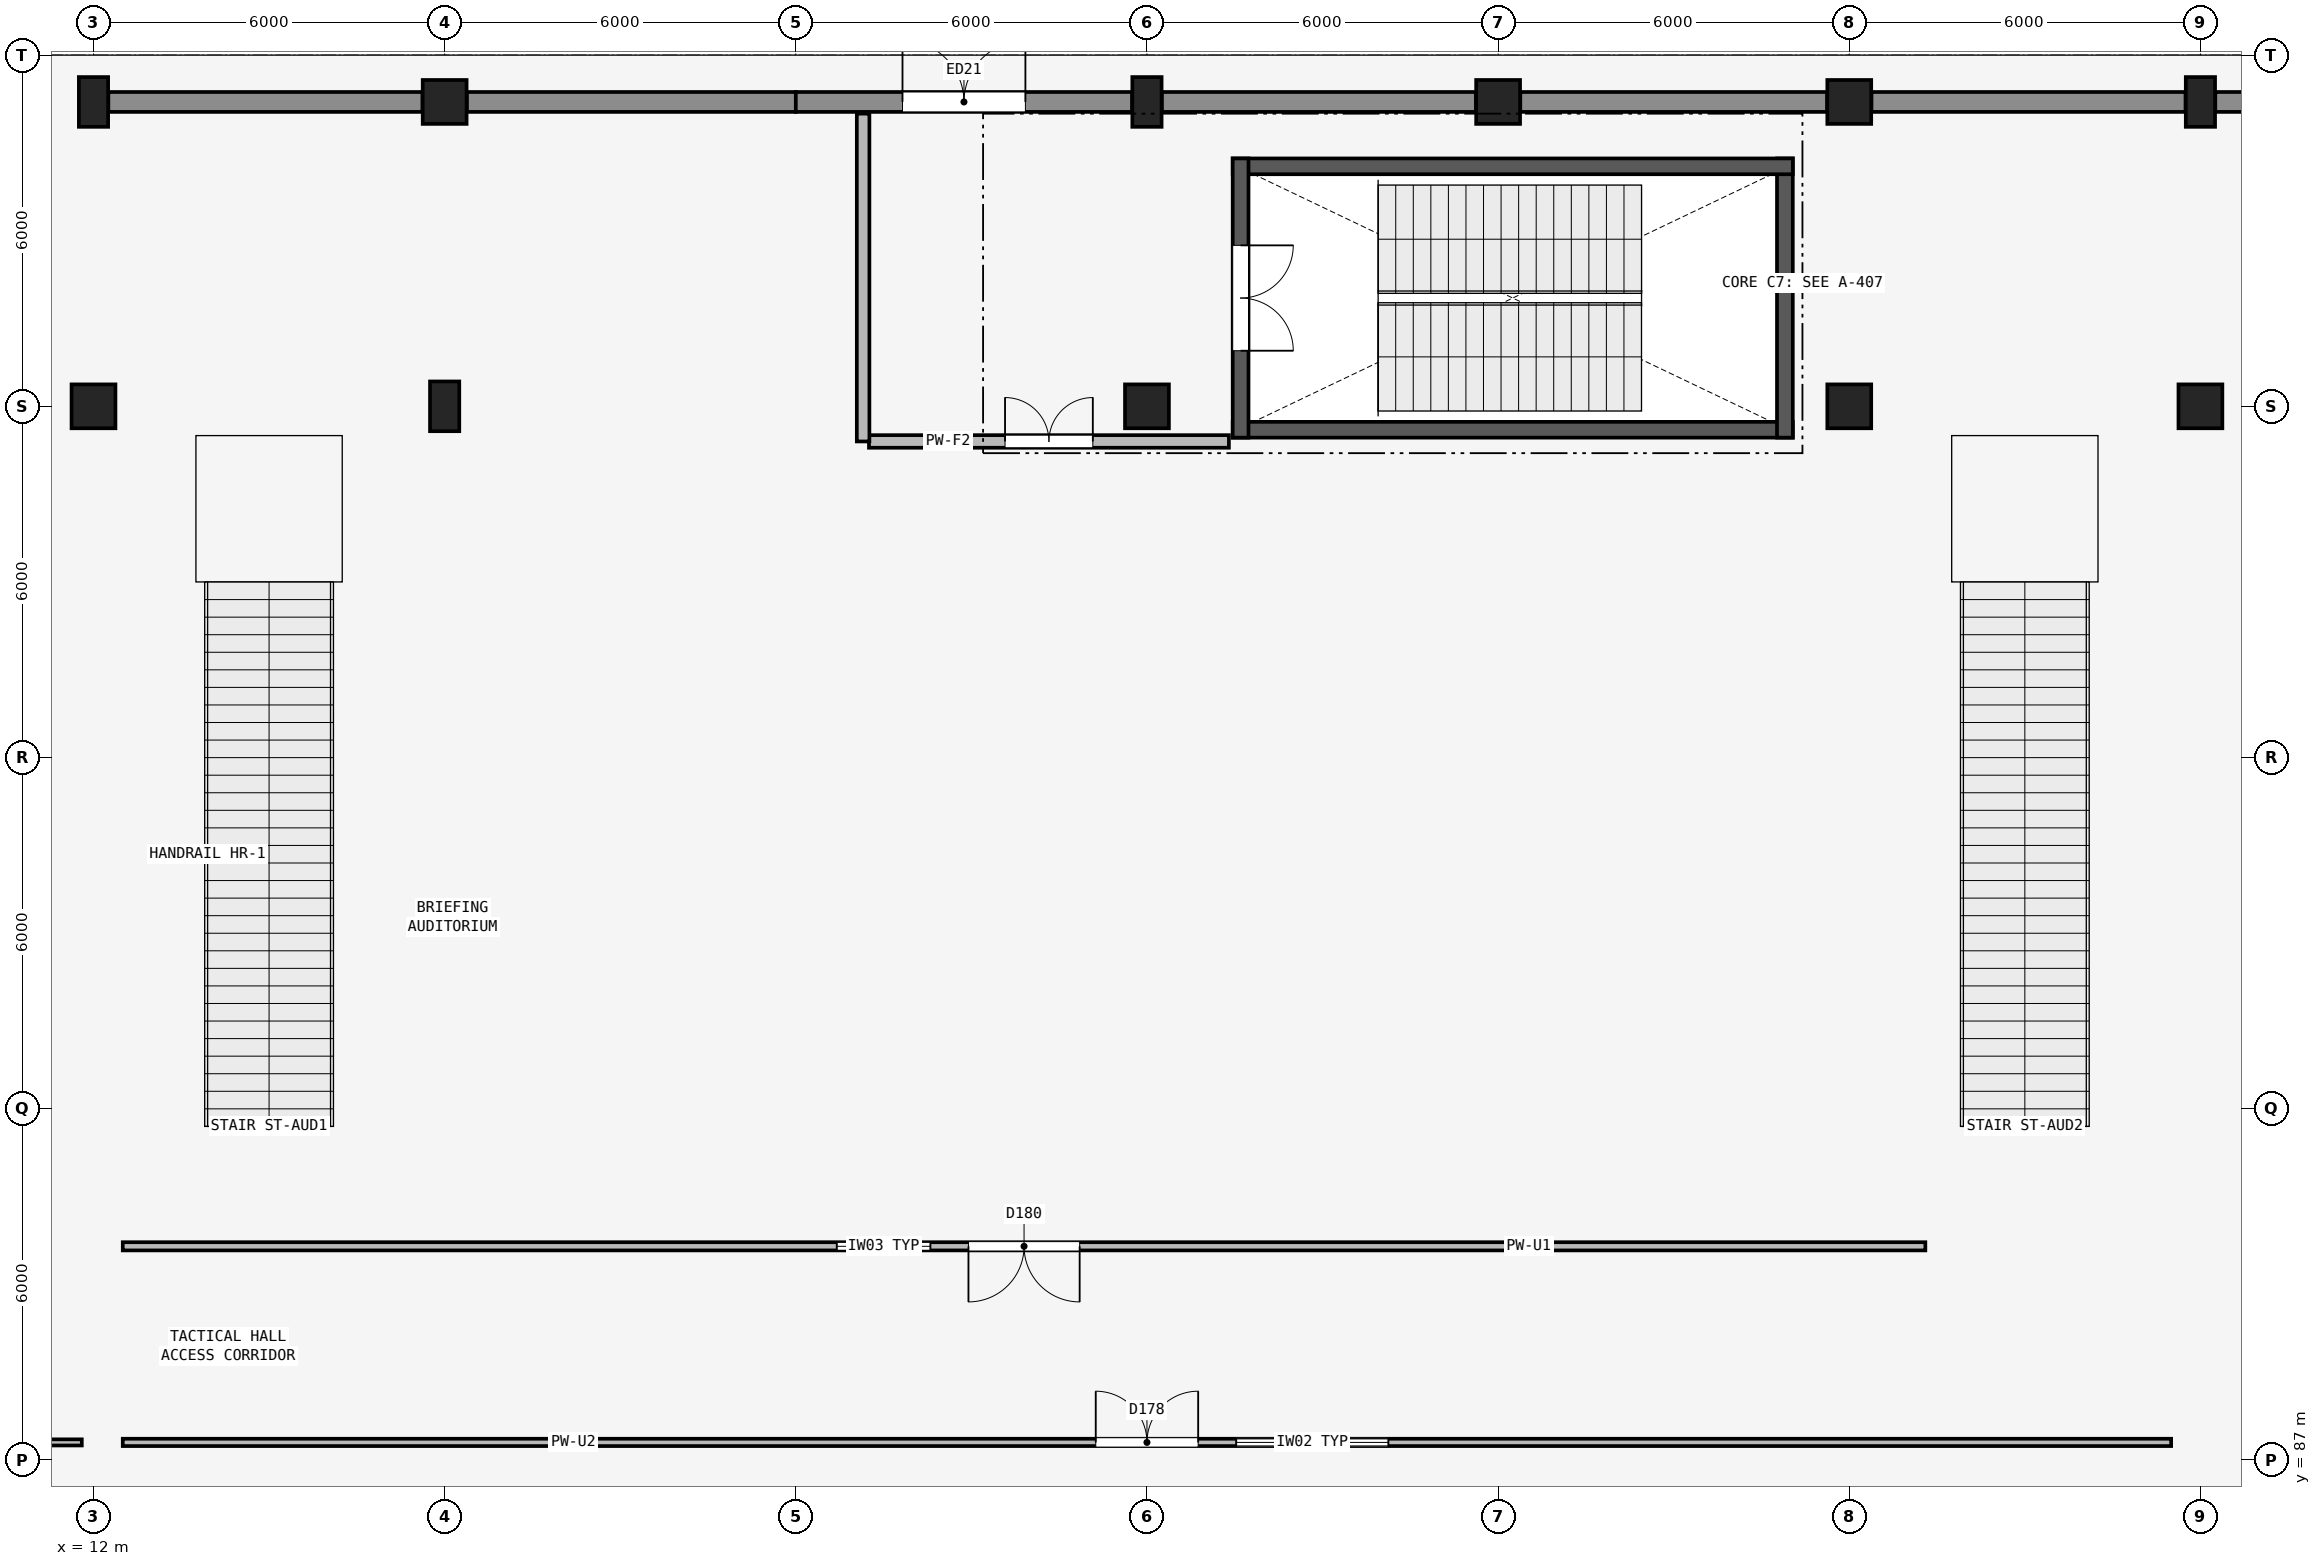
"""IFC4 building model, lengths in metres.
Left out: names, types, materials, properties, quantities, classifications, styles, units other than length and angle.
Written with IfcOpenShell. Run it as: python <this file> out.ifc"""

import sys

from ifc_helpers import new_model, si_unit, direction, frame, frame_2d, origin, origin_2d, place, context, subcontext, project, spatial, rectangle, extrude, element, fill, save


model = new_model("IFC4")
c1 = context("Model", 3, precision=1e-05, world=origin(), true_north=direction((0.0, 1.0)))
c2 = subcontext(c1, "Body", "Model", "MODEL_VIEW")
j1 = project(units=[si_unit("LENGTHUNIT", "METRE"), si_unit("PLANEANGLEUNIT", "RADIAN")], contexts=[c1])
p1 = place(None, origin())
s1 = spatial("IfcSite", under=j1, at=p1, CompositionType="ELEMENT")
p2 = place(p1, origin())
s2 = spatial("IfcBuilding", under=s1, at=p2, CompositionType="ELEMENT")
p3 = place(p2, origin())
s3 = spatial("IfcBuildingStorey", under=s2, at=p3, CompositionType="ELEMENT", Elevation=0.0)
p4 = place(p3, frame((12.0, 105.0, 0.0), z_axis=(0.0, 0.0, 1.0), x_axis=(1.0, 0.0, 0.0)))
e1 = element("IfcColumn", 1, at=p4, inside=s3, PredefinedType="COLUMN", context=c2, shape_type="SweptSolid", body=[
    extrude(rectangle(XDim=0.75, YDim=0.75, at=origin_2d()), origin(), (0.0, 0.0, 1.0), 4.8),
])
for number, where, z_axis, x_axis in (
    (2, (12.0, 110.2, 0.0), (0.0, 0.0, 1.0), (1.0, 0.0, 0.0)),
    (3, (18.0, 105.0, 0.0), (0.0, 0.0, 1.0), (1.0, 0.0, 0.0)),
):
    element("IfcColumn", number, at=place(p3, frame(where, z_axis=z_axis, x_axis=x_axis)), inside=s3, PredefinedType="COLUMN", context=c2, shape_type="SweptSolid", body=[
        extrude(rectangle(XDim=0.5, YDim=0.85, at=origin_2d()), origin(), (0.0, 0.0, 1.0), 4.8),
    ])
for number, where, z_axis, x_axis in (
    (4, (18.0, 110.2, 0.0), (0.0, 0.0, 1.0), (1.0, 0.0, 0.0)),
    (5, (30.0, 105.0, 0.0), (0.0, 0.0, 1.0), (1.0, 0.0, 0.0)),
):
    element("IfcColumn", number, at=place(p3, frame(where, z_axis=z_axis, x_axis=x_axis)), inside=s3, PredefinedType="COLUMN", context=c2, shape_type="SweptSolid", body=[
        extrude(rectangle(XDim=0.75, YDim=0.75, at=origin_2d()), origin(), (0.0, 0.0, 1.0), 4.8),
    ])
p5 = place(p3, frame((30.0, 110.2, 0.0), z_axis=(0.0, 0.0, 1.0), x_axis=(1.0, 0.0, 0.0)))
e6 = element("IfcColumn", 6, at=p5, inside=s3, PredefinedType="COLUMN", context=c2, shape_type="SweptSolid", body=[
    extrude(rectangle(XDim=0.5, YDim=0.85, at=origin_2d()), origin(), (0.0, 0.0, 1.0), 4.8),
])
for number, where, z_axis, x_axis in (
    (7, (36.0, 110.2, 0.0), (0.0, 0.0, 1.0), (1.0, 0.0, 0.0)),
    (8, (42.0, 105.0, 0.0), (0.0, 0.0, 1.0), (1.0, 0.0, 0.0)),
    (9, (42.0, 110.2, 0.0), (0.0, 0.0, 1.0), (1.0, 0.0, 0.0)),
    (10, (48.0, 105.0, 0.0), (0.0, 0.0, 1.0), (1.0, 0.0, 0.0)),
):
    element("IfcColumn", number, at=place(p3, frame(where, z_axis=z_axis, x_axis=x_axis)), inside=s3, PredefinedType="COLUMN", context=c2, shape_type="SweptSolid", body=[
        extrude(rectangle(XDim=0.75, YDim=0.75, at=origin_2d()), origin(), (0.0, 0.0, 1.0), 4.8),
    ])
p6 = place(p3, frame((48.0, 110.2, 0.0), z_axis=(0.0, 0.0, 1.0), x_axis=(1.0, 0.0, 0.0)))
e11 = element("IfcColumn", 11, at=p6, inside=s3, PredefinedType="COLUMN", context=c2, shape_type="SweptSolid", body=[
    extrude(rectangle(XDim=0.5, YDim=0.85, at=origin_2d()), origin(), (0.0, 0.0, 1.0), 4.8),
])
p7 = place(p3, frame((12.254, 110.2, 0.0), z_axis=(0.0, 0.0, 1.0), x_axis=(1.0, 0.0, 0.0)))
e12 = element("IfcWall", 12, at=p7, inside=s3, PredefinedType="SOLIDWALL", context=c2, shape_type="SweptSolid", body=[
    extrude(rectangle(XDim=5.367, YDim=0.34, at=frame_2d((2.684, 0.0))), origin(), (0.0, 0.0, 1.0), 4.083),
])
p8 = place(p3, frame((18.379, 110.2, 0.0), z_axis=(0.0, 0.0, 1.0), x_axis=(1.0, 0.0, 0.0)))
e13 = element("IfcWall", 13, at=p8, inside=s3, PredefinedType="SOLIDWALL", context=c2, shape_type="SweptSolid", body=[
    extrude(rectangle(XDim=5.621, YDim=0.34, at=frame_2d((2.811, 0.0))), origin(), (0.0, 0.0, 1.0), 3.69),
])
p9 = place(p3, frame((24.0, 110.2, 0.0), z_axis=(0.0, 0.0, 1.0), x_axis=(1.0, 0.0, 0.0)))
e14 = element("IfcWall", 14, at=p9, inside=s3, PredefinedType="SOLIDWALL", context=c2, shape_type="SweptSolid", body=[
    extrude(rectangle(XDim=5.746, YDim=0.34, at=frame_2d((2.873, 0.0))), origin(), (0.0, 0.0, 1.0), 3.69),
])
p10 = place(p9, frame((1.823, 0.0, 0.0)))
e15 = element("IfcOpeningElement", 15, at=p10, cuts=e14, PredefinedType="OPENING", context=c2, shape_type="SweptSolid", body=[
    extrude(rectangle(XDim=2.1, YDim=2.4, at=frame_2d((1.05, 1.2))), frame((0.0, 0.18, 0.0), z_axis=(0.0, -1.0, 0.0), x_axis=(1.0, 0.0, 0.0)), (0.0, 0.0, 1.0), 0.36),
])
p11 = place(p3, frame((30.254, 110.2, 0.0), z_axis=(0.0, 0.0, 1.0), x_axis=(1.0, 0.0, 0.0)))
e16 = element("IfcWall", 16, at=p11, inside=s3, PredefinedType="SOLIDWALL", context=c2, shape_type="SweptSolid", body=[
    extrude(rectangle(XDim=5.367, YDim=0.34, at=frame_2d((2.684, 0.0))), origin(), (0.0, 0.0, 1.0), 3.69),
])
p12 = place(p3, frame((36.379, 110.2, 0.0), z_axis=(0.0, 0.0, 1.0), x_axis=(1.0, 0.0, 0.0)))
e17 = element("IfcWall", 17, at=p12, inside=s3, PredefinedType="SOLIDWALL", context=c2, shape_type="SweptSolid", body=[
    extrude(rectangle(XDim=5.242, YDim=0.34, at=frame_2d((2.621, 0.0))), origin(), (0.0, 0.0, 1.0), 4.083),
])
for number, where, z_axis, x_axis in (
    (18, (42.379, 110.2, 0.0), (0.0, 0.0, 1.0), (1.0, 0.0, 0.0)),
    (19, (48.254, 110.2, 0.0), (0.0, 0.0, 1.0), (1.0, 0.0, 0.0)),
):
    element("IfcWall", number, at=place(p3, frame(where, z_axis=z_axis, x_axis=x_axis)), inside=s3, PredefinedType="SOLIDWALL", context=c2, shape_type="SweptSolid", body=[
        extrude(rectangle(XDim=5.367, YDim=0.34, at=frame_2d((2.684, 0.0))), origin(), (0.0, 0.0, 1.0), 4.083),
    ])
p13 = place(p3, frame((31.465, 104.6, 0.0), z_axis=(0.0, 0.0, 1.0), x_axis=(1.0, 0.0, 0.0)))
e20 = element("IfcWall", 20, at=p13, inside=s3, PredefinedType="SHEAR", context=c2, shape_type="SweptSolid", body=[
    extrude(rectangle(XDim=9.57, YDim=0.27, at=frame_2d((4.785, 0.0))), origin(), (0.0, 0.0, 1.0), 4.66),
])
p14 = place(p3, frame((40.9, 104.465, 0.0), z_axis=(0.0, 0.0, 1.0), x_axis=(0.0, 1.0, 0.0)))
e21 = element("IfcWall", 21, at=p14, inside=s3, PredefinedType="SHEAR", context=c2, shape_type="SweptSolid", body=[
    extrude(rectangle(XDim=4.77, YDim=0.27, at=frame_2d((2.385, 0.0))), origin(), (0.0, 0.0, 1.0), 4.66),
])
p15 = place(p3, frame((41.035, 109.1, 0.0), z_axis=(0.0, 0.0, 1.0), x_axis=(-1.0, 0.0, 0.0)))
e22 = element("IfcWall", 22, at=p15, inside=s3, PredefinedType="SHEAR", context=c2, shape_type="SweptSolid", body=[
    extrude(rectangle(XDim=9.57, YDim=0.27, at=frame_2d((4.785, 0.0))), origin(), (0.0, 0.0, 1.0), 4.66),
])
p16 = place(p3, frame((31.6, 109.235, 0.0), z_axis=(0.0, 0.0, 1.0), x_axis=(0.0, -1.0, 0.0)))
e23 = element("IfcWall", 23, at=p16, inside=s3, PredefinedType="SHEAR", context=c2, shape_type="SweptSolid", body=[
    extrude(rectangle(XDim=4.77, YDim=0.27, at=frame_2d((2.385, 0.0))), origin(), (0.0, 0.0, 1.0), 4.66),
])
p17 = place(p16, frame((1.485, 0.0, 0.0)))
e24 = element("IfcOpeningElement", 24, at=p17, cuts=e23, PredefinedType="OPENING", context=c2, shape_type="SweptSolid", body=[
    extrude(rectangle(XDim=1.8, YDim=2.2, at=frame_2d((0.9, 1.1))), frame((0.0, 0.145, 0.0), z_axis=(0.0, -1.0, 0.0), x_axis=(1.0, 0.0, 0.0)), (0.0, 0.0, 1.0), 0.29),
])
p18 = place(p3, frame((25.25, 104.4, 0.0), z_axis=(0.0, 0.0, 1.0), x_axis=(1.0, 0.0, 0.0)))
e25 = element("IfcWall", 25, at=p18, inside=s3, PredefinedType="PARTITIONING", context=c2, shape_type="SweptSolid", body=[
    extrude(rectangle(XDim=6.15, YDim=0.215, at=frame_2d((3.075, 0.0))), origin(), (0.0, 0.0, 1.0), 3.29),
])
p19 = place(p18, frame((2.325, 0.0, 0.0)))
e26 = element("IfcOpeningElement", 26, at=p19, cuts=e25, PredefinedType="OPENING", context=c2, shape_type="SweptSolid", body=[
    extrude(rectangle(XDim=1.5, YDim=2.15, at=frame_2d((0.75, 1.075))), frame((0.0, 0.117, 0.0), z_axis=(0.0, -1.0, 0.0), x_axis=(1.0, 0.0, 0.0)), (0.0, 0.0, 1.0), 0.235),
])
p20 = place(p3, frame((25.15, 104.4, 0.0), z_axis=(0.0, 0.0, 1.0), x_axis=(0.0, 1.0, 0.0)))
e27 = element("IfcWall", 27, at=p20, inside=s3, PredefinedType="PARTITIONING", context=c2, shape_type="SweptSolid", body=[
    extrude(rectangle(XDim=5.6, YDim=0.215, at=frame_2d((2.8, 0.0))), origin(), (0.0, 0.0, 1.0), 3.69),
])
p21 = place(p3, frame((12.5, 87.3, 0.0), z_axis=(0.0, 0.0, 1.0), x_axis=(1.0, 0.0, 0.0)))
e28 = element("IfcWall", 28, at=p21, inside=s3, PredefinedType="PARTITIONING", context=c2, shape_type="SweptSolid", body=[
    extrude(rectangle(XDim=35.0, YDim=0.125, at=frame_2d((17.5, 0.0))), origin(), (0.0, 0.0, 1.0), 3.29),
])
p22 = place(p21, frame((16.625, 0.0, 0.0)))
e29 = element("IfcOpeningElement", 29, at=p22, cuts=e28, PredefinedType="OPENING", context=c2, shape_type="SweptSolid", body=[
    extrude(rectangle(XDim=1.75, YDim=2.25, at=frame_2d((0.875, 1.125))), frame((0.0, 0.073, 0.0), z_axis=(0.0, -1.0, 0.0), x_axis=(1.0, 0.0, 0.0)), (0.0, 0.0, 1.0), 0.145),
])
p23 = place(p21, frame((19.025, 0.0, 1.0)))
e30 = element("IfcOpeningElement", 30, at=p23, cuts=e28, PredefinedType="OPENING", context=c2, shape_type="SweptSolid", body=[
    extrude(rectangle(XDim=2.6, YDim=1.2, at=frame_2d((1.3, 0.6))), frame((0.0, 0.073, 0.0), z_axis=(0.0, -1.0, 0.0), x_axis=(1.0, 0.0, 0.0)), (0.0, 0.0, 1.0), 0.145),
])
p24 = place(p3, frame((6.5, 87.3, 0.0), z_axis=(0.0, 0.0, 1.0), x_axis=(1.0, 0.0, 0.0)))
e31 = element("IfcWall", 31, at=p24, inside=s3, PredefinedType="PARTITIONING", context=c2, shape_type="SweptSolid", body=[
    extrude(rectangle(XDim=5.3, YDim=0.105, at=frame_2d((2.65, 0.0))), origin(), (0.0, 0.0, 1.0), 3.29),
])
p25 = place(p24, frame((2.175, 0.0, 0.0)))
e32 = element("IfcOpeningElement", 32, at=p25, cuts=e31, PredefinedType="OPENING", context=c2, shape_type="SweptSolid", body=[
    extrude(rectangle(XDim=0.95, YDim=2.15, at=frame_2d((0.475, 1.075))), frame((0.0, 0.062, 0.0), z_axis=(0.0, -1.0, 0.0), x_axis=(1.0, 0.0, 0.0)), (0.0, 0.0, 1.0), 0.125),
])
p26 = place(p3, frame((43.3, 90.65, 0.0), z_axis=(0.0, 0.0, 1.0), x_axis=(-1.0, 0.0, 0.0)))
e33 = element("IfcWall", 33, at=p26, inside=s3, PredefinedType="PARTITIONING", context=c2, shape_type="SweptSolid", body=[
    extrude(rectangle(XDim=30.8, YDim=0.14, at=frame_2d((15.4, 0.0))), origin(), (0.0, 0.0, 1.0), 3.29),
])
p27 = place(p26, frame((14.45, 0.0, 0.0)))
e34 = element("IfcOpeningElement", 34, at=p27, cuts=e33, PredefinedType="OPENING", context=c2, shape_type="SweptSolid", body=[
    extrude(rectangle(XDim=1.9, YDim=2.3, at=frame_2d((0.95, 1.15))), frame((0.0, 0.08, 0.0), z_axis=(0.0, -1.0, 0.0), x_axis=(1.0, 0.0, 0.0)), (0.0, 0.0, 1.0), 0.16),
])
p28 = place(p26, frame((17.0, 0.0, 1.05)))
e35 = element("IfcOpeningElement", 35, at=p28, cuts=e33, PredefinedType="OPENING", context=c2, shape_type="SweptSolid", body=[
    extrude(rectangle(XDim=1.6, YDim=1.1, at=frame_2d((0.8, 0.55))), frame((0.0, 0.08, 0.0), z_axis=(0.0, -1.0, 0.0), x_axis=(1.0, 0.0, 0.0)), (0.0, 0.0, 1.0), 0.16),
])
p29 = place(p10, origin())
e36 = element("IfcDoor", 36, at=p29, inside=s3, OperationType="DOUBLE_DOOR_SINGLE_SWING", PredefinedType="DOOR", context=c2, shape_type="SweptSolid", body=[
    extrude(rectangle(XDim=2.1, YDim=2.4, at=frame_2d((1.05, 1.2))), frame((0.0, 0.025, 0.0), z_axis=(0.0, -1.0, 0.0), x_axis=(1.0, 0.0, 0.0)), (0.0, 0.0, 1.0), 0.05),
])
fill(e15, e36)
p30 = place(p17, origin())
e37 = element("IfcDoor", 37, at=p30, inside=s3, OperationType="DOUBLE_DOOR_SINGLE_SWING", PredefinedType="DOOR", context=c2, shape_type="SweptSolid", body=[
    extrude(rectangle(XDim=1.8, YDim=2.2, at=frame_2d((0.9, 1.1))), frame((0.0, 0.025, 0.0), z_axis=(0.0, -1.0, 0.0), x_axis=(1.0, 0.0, 0.0)), (0.0, 0.0, 1.0), 0.05),
])
fill(e24, e37)
p31 = place(p19, origin())
e38 = element("IfcDoor", 38, at=p31, inside=s3, OperationType="DOUBLE_DOOR_SINGLE_SWING", PredefinedType="DOOR", context=c2, shape_type="SweptSolid", body=[
    extrude(rectangle(XDim=1.5, YDim=2.15, at=frame_2d((0.75, 1.075))), frame((0.0, 0.025, 0.0), z_axis=(0.0, -1.0, 0.0), x_axis=(1.0, 0.0, 0.0)), (0.0, 0.0, 1.0), 0.05),
])
fill(e26, e38)
p32 = place(p22, origin())
e39 = element("IfcDoor", 39, at=p32, inside=s3, OperationType="DOUBLE_DOOR_SINGLE_SWING", PredefinedType="DOOR", context=c2, shape_type="SweptSolid", body=[
    extrude(rectangle(XDim=1.75, YDim=2.25, at=frame_2d((0.875, 1.125))), frame((0.0, 0.025, 0.0), z_axis=(0.0, -1.0, 0.0), x_axis=(1.0, 0.0, 0.0)), (0.0, 0.0, 1.0), 0.05),
])
fill(e29, e39)
p33 = place(p23, origin())
e40 = element("IfcWindow", 40, at=p33, inside=s3, PartitioningType="SINGLE_PANEL", PredefinedType="WINDOW", context=c2, shape_type="SweptSolid", body=[
    extrude(rectangle(XDim=2.6, YDim=1.2, at=frame_2d((1.3, 0.6))), frame((0.0, 0.03, 0.0), z_axis=(0.0, -1.0, 0.0), x_axis=(1.0, 0.0, 0.0)), (0.0, 0.0, 1.0), 0.06),
])
fill(e30, e40)
p34 = place(p27, origin())
e41 = element("IfcDoor", 41, at=p34, inside=s3, OperationType="DOUBLE_DOOR_SINGLE_SWING", PredefinedType="DOOR", context=c2, shape_type="SweptSolid", body=[
    extrude(rectangle(XDim=1.9, YDim=2.3, at=frame_2d((0.95, 1.15))), frame((0.0, 0.025, 0.0), z_axis=(0.0, -1.0, 0.0), x_axis=(1.0, 0.0, 0.0)), (0.0, 0.0, 1.0), 0.05),
])
fill(e34, e41)
p35 = place(p28, origin())
e42 = element("IfcWindow", 42, at=p35, inside=s3, PartitioningType="SINGLE_PANEL", PredefinedType="WINDOW", context=c2, shape_type="SweptSolid", body=[
    extrude(rectangle(XDim=1.6, YDim=1.1, at=frame_2d((0.8, 0.55))), frame((0.0, 0.03, 0.0), z_axis=(0.0, -1.0, 0.0), x_axis=(1.0, 0.0, 0.0)), (0.0, 0.0, 1.0), 0.06),
])
fill(e35, e42)
save(model, sys.argv[1])
